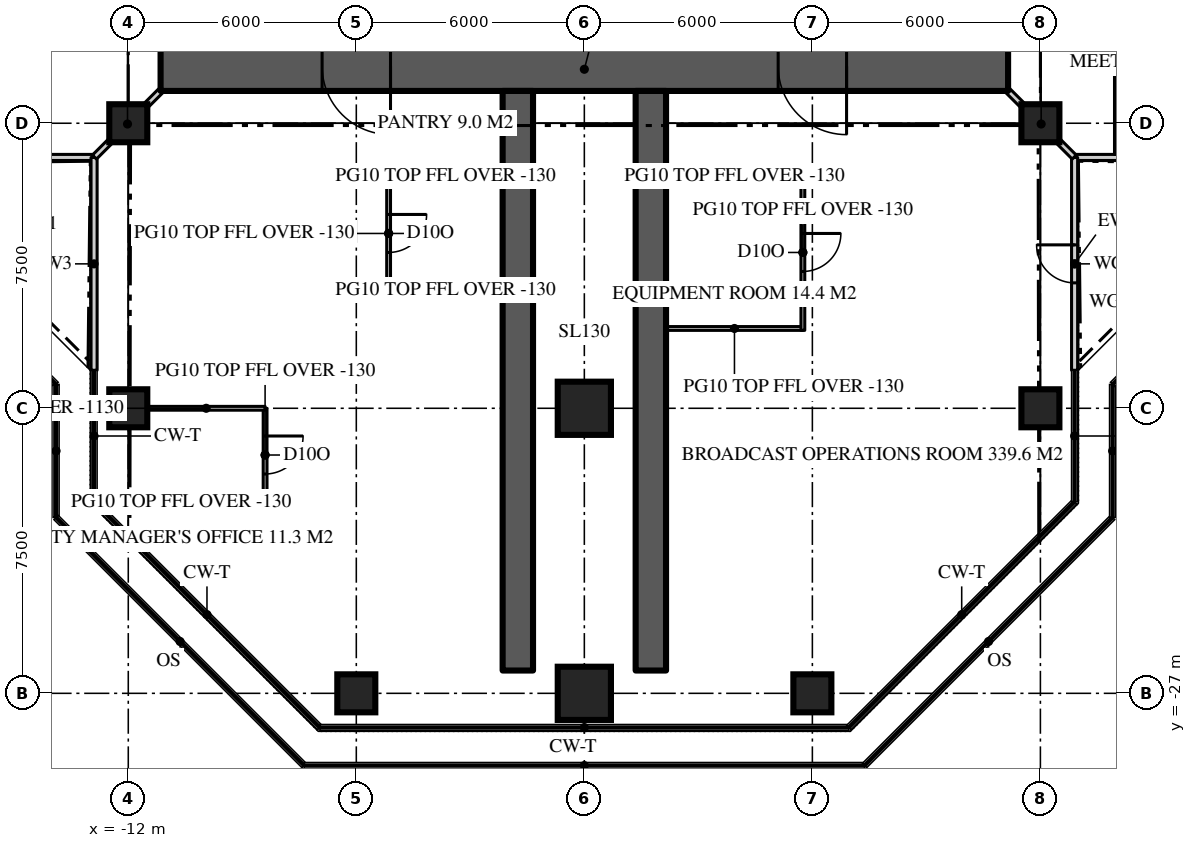
"""IFC4 building model, lengths in metres.
Left out: names, types, materials, properties, quantities, classifications, styles, units other than length and angle.
Written with IfcOpenShell. Run it as: python <this file> out.ifc"""

import sys

from ifc_helpers import new_model, si_unit, direction, frame, frame_2d, origin, origin_2d, place, context, subcontext, project, spatial, rectangle, extrude, element, fill, save


model = new_model("IFC4")
c1 = context("Model", 3, precision=1e-05, world=origin(), true_north=direction((0.0, 1.0)))
c2 = subcontext(c1, "Body", "Model", "MODEL_VIEW")
j1 = project(units=[si_unit("LENGTHUNIT", "METRE"), si_unit("PLANEANGLEUNIT", "RADIAN")], contexts=[c1])
p1 = place(None, origin())
s1 = spatial("IfcSite", under=j1, at=p1, CompositionType="ELEMENT")
p2 = place(p1, origin())
s2 = spatial("IfcBuilding", under=s1, at=p2, CompositionType="ELEMENT")
p3 = place(p2, frame((0.0, 0.0, 271.2)))
s3 = spatial("IfcBuildingStorey", under=s2, at=p3, CompositionType="ELEMENT", Elevation=271.2)
p4 = place(p3, frame((11.15, -10.5, 0.0), z_axis=(0.0, 0.0, 1.0), x_axis=(-1.0, 0.0, 0.0)))
e1 = element("IfcWall", 1, at=p4, inside=s3, PredefinedType="SHEAR", context=c2, shape_type="SweptSolid", body=[
    extrude(rectangle(XDim=22.3, YDim=1.3, at=frame_2d((11.15, 0.0))), origin(), (0.0, 0.0, 1.0), 3.9),
])
p5 = place(p4, frame((16.25, 0.0, 0.0)))
e2 = element("IfcOpeningElement", 2, at=p5, cuts=e1, PredefinedType="OPENING", context=c2, shape_type="SweptSolid", body=[
    extrude(rectangle(XDim=1.8, YDim=2.2, at=frame_2d((0.9, 1.1))), frame((0.0, 0.66, 0.0), z_axis=(0.0, -1.0, 0.0), x_axis=(1.0, 0.0, 0.0)), (0.0, 0.0, 1.0), 1.32),
])
p6 = place(p4, frame((4.25, 0.0, 0.0)))
e3 = element("IfcOpeningElement", 3, at=p6, cuts=e1, PredefinedType="OPENING", context=c2, shape_type="SweptSolid", body=[
    extrude(rectangle(XDim=1.8, YDim=2.2, at=frame_2d((0.9, 1.1))), frame((0.0, 0.66, 0.0), z_axis=(0.0, -1.0, 0.0), x_axis=(1.0, 0.0, 0.0)), (0.0, 0.0, 1.0), 1.32),
])
for number, where, z_axis, x_axis in (
    (4, (-1.75, -11.15, 0.0), (0.0, 0.0, 1.0), (0.0, -1.0, 0.0)),
    (5, (1.75, -11.15, 0.0), (0.0, 0.0, 1.0), (0.0, -1.0, 0.0)),
):
    element("IfcWall", number, at=place(p3, frame(where, z_axis=z_axis, x_axis=x_axis)), inside=s3, PredefinedType="SHEAR", context=c2, shape_type="SweptSolid", body=[
        extrude(rectangle(XDim=15.25, YDim=0.8, at=frame_2d((7.625, 0.0))), origin(), (0.0, 0.0, 1.0), 3.9),
    ])
p7 = place(p3, frame((-6.0, -27.0, 0.0), z_axis=(0.0, 0.0, 1.0), x_axis=(1.0, 0.0, 0.0)))
e6 = element("IfcColumn", 6, at=p7, inside=s3, PredefinedType="COLUMN", context=c2, shape_type="SweptSolid", body=[
    extrude(rectangle(XDim=1.0, YDim=1.0, at=origin_2d()), origin(), (0.0, 0.0, 1.0), 3.9),
])
p8 = place(p3, frame((0.0, -27.0, 0.0), z_axis=(0.0, 0.0, 1.0), x_axis=(1.0, 0.0, 0.0)))
e7 = element("IfcColumn", 7, at=p8, inside=s3, PredefinedType="COLUMN", context=c2, shape_type="SweptSolid", body=[
    extrude(rectangle(XDim=1.4, YDim=1.4, at=origin_2d()), origin(), (0.0, 0.0, 1.0), 3.9),
])
for number, where, z_axis, x_axis in (
    (8, (6.0, -27.0, 0.0), (0.0, 0.0, 1.0), (1.0, 0.0, 0.0)),
    (9, (-12.0, -19.5, 0.0), (0.0, 0.0, 1.0), (1.0, 0.0, 0.0)),
):
    element("IfcColumn", number, at=place(p3, frame(where, z_axis=z_axis, x_axis=x_axis)), inside=s3, PredefinedType="COLUMN", context=c2, shape_type="SweptSolid", body=[
        extrude(rectangle(XDim=1.0, YDim=1.0, at=origin_2d()), origin(), (0.0, 0.0, 1.0), 3.9),
    ])
p9 = place(p3, frame((0.0, -19.5, 0.0), z_axis=(0.0, 0.0, 1.0), x_axis=(1.0, 0.0, 0.0)))
e10 = element("IfcColumn", 10, at=p9, inside=s3, PredefinedType="COLUMN", context=c2, shape_type="SweptSolid", body=[
    extrude(rectangle(XDim=1.4, YDim=1.4, at=origin_2d()), origin(), (0.0, 0.0, 1.0), 3.9),
])
for number, where, z_axis, x_axis in (
    (11, (12.0, -19.5, 0.0), (0.0, 0.0, 1.0), (1.0, 0.0, 0.0)),
    (12, (-12.0, -12.0, 0.0), (0.0, 0.0, 1.0), (1.0, 0.0, 0.0)),
    (13, (12.0, -12.0, 0.0), (0.0, 0.0, 1.0), (1.0, 0.0, 0.0)),
):
    element("IfcColumn", number, at=place(p3, frame(where, z_axis=z_axis, x_axis=x_axis)), inside=s3, PredefinedType="COLUMN", context=c2, shape_type="SweptSolid", body=[
        extrude(rectangle(XDim=1.0, YDim=1.0, at=origin_2d()), origin(), (0.0, 0.0, 1.0), 3.9),
    ])
p10 = place(p3, frame((12.9, -12.9, 0.0), z_axis=(0.0, 0.0, 1.0), x_axis=(1.0, 0.0, 0.0)))
e14 = element("IfcWall", 14, at=p10, inside=s3, PredefinedType="SOLIDWALL", context=c2, shape_type="SweptSolid", body=[
    extrude(rectangle(XDim=5.6, YDim=0.16, at=frame_2d((2.8, 0.0))), origin(), (0.0, 0.0, 1.0), 3.77),
])
p11 = place(p3, frame((-18.5, -12.9, 0.0), z_axis=(0.0, 0.0, 1.0), x_axis=(1.0, 0.0, 0.0)))
e15 = element("IfcWall", 15, at=p11, inside=s3, PredefinedType="SOLIDWALL", context=c2, shape_type="SweptSolid", body=[
    extrude(rectangle(XDim=5.6, YDim=0.16, at=frame_2d((2.8, 0.0))), origin(), (0.0, 0.0, 1.0), 3.77),
])
p12 = place(p11, frame((2.3, 0.0, 0.0)))
e16 = element("IfcOpeningElement", 16, at=p12, cuts=e15, PredefinedType="OPENING", context=c2, shape_type="SweptSolid", body=[
    extrude(rectangle(XDim=1.0, YDim=2.2, at=frame_2d((0.5, 1.1))), frame((0.0, 0.09, 0.0), z_axis=(0.0, -1.0, 0.0), x_axis=(1.0, 0.0, 0.0)), (0.0, 0.0, 1.0), 0.18),
])
p13 = place(p3, frame((-12.9, -12.9, 0.0), z_axis=(0.0, 0.0, 1.0), x_axis=(0.0, -1.0, 0.0)))
e17 = element("IfcWall", 17, at=p13, inside=s3, PredefinedType="SOLIDWALL", context=c2, shape_type="SweptSolid", body=[
    extrude(rectangle(XDim=5.6, YDim=0.16, at=frame_2d((2.8, 0.0))), origin(), (0.0, 0.0, 1.0), 3.77),
])
p14 = place(p3, frame((12.9, -18.5, 0.0), z_axis=(0.0, 0.0, 1.0), x_axis=(0.0, 1.0, 0.0)))
e18 = element("IfcWall", 18, at=p14, inside=s3, PredefinedType="SOLIDWALL", context=c2, shape_type="SweptSolid", body=[
    extrude(rectangle(XDim=5.6, YDim=0.16, at=frame_2d((2.8, 0.0))), origin(), (0.0, 0.0, 1.0), 3.77),
])
p15 = place(p14, frame((2.3, 0.0, 0.0)))
e19 = element("IfcOpeningElement", 19, at=p15, cuts=e18, PredefinedType="OPENING", context=c2, shape_type="SweptSolid", body=[
    extrude(rectangle(XDim=1.0, YDim=2.2, at=frame_2d((0.5, 1.1))), frame((0.0, 0.09, 0.0), z_axis=(0.0, -1.0, 0.0), x_axis=(1.0, 0.0, 0.0)), (0.0, 0.0, 1.0), 0.18),
])
p16 = place(p3, frame((14.0, -4.0, 0.0), z_axis=(0.0, 0.0, 1.0), x_axis=(0.0, -1.0, 0.0)))
e20 = element("IfcWall", 20, at=p16, inside=s3, PredefinedType="PARTITIONING", context=c2, shape_type="SweptSolid", body=[
    extrude(rectangle(XDim=8.82, YDim=0.1, at=frame_2d((4.41, 0.0))), origin(), (0.0, 0.0, 1.0), 3.18),
])
p17 = place(p3, frame((-8.4, -19.5, 0.0), z_axis=(0.0, 0.0, 1.0), x_axis=(0.0, -1.0, 0.0)))
e21 = element("IfcWall", 21, at=p17, inside=s3, PredefinedType="PARTITIONING", context=c2, shape_type="SweptSolid", body=[
    extrude(rectangle(XDim=2.459, YDim=0.1, at=frame_2d((1.229, 0.0))), origin(), (0.0, 0.0, 1.0), 3.77),
])
p18 = place(p17, frame((0.729, 0.0, 0.0)))
e22 = element("IfcOpeningElement", 22, at=p18, cuts=e21, PredefinedType="OPENING", context=c2, shape_type="SweptSolid", body=[
    extrude(rectangle(XDim=1.0, YDim=2.2, at=frame_2d((0.5, 1.1))), frame((0.0, 0.06, 0.0), z_axis=(0.0, -1.0, 0.0), x_axis=(1.0, 0.0, 0.0)), (0.0, 0.0, 1.0), 0.12),
])
p19 = place(p3, frame((-8.4, -19.5, 0.0), z_axis=(0.0, 0.0, 1.0), x_axis=(-1.0, 0.0, 0.0)))
e23 = element("IfcWall", 23, at=p19, inside=s3, PredefinedType="PARTITIONING", context=c2, shape_type="SweptSolid", body=[
    extrude(rectangle(XDim=3.1, YDim=0.1, at=frame_2d((1.55, 0.0))), origin(), (0.0, 0.0, 1.0), 2.77),
])
p20 = place(p3, frame((-8.4, -21.959, 0.0), z_axis=(0.0, 0.0, 1.0), x_axis=(-1.0, 0.0, 0.0)))
e24 = element("IfcWall", 24, at=p20, inside=s3, PredefinedType="PARTITIONING", context=c2, shape_type="SweptSolid", body=[
    extrude(rectangle(XDim=4.42, YDim=0.1, at=frame_2d((2.21, 0.0))), origin(), (0.0, 0.0, 1.0), 3.77),
])
for number, where, z_axis, x_axis in (
    (25, (2.15, -13.4, 0.0), (0.0, 0.0, 1.0), (1.0, 0.0, 0.0)),
    (26, (2.15, -17.4, 0.0), (0.0, 0.0, 1.0), (1.0, 0.0, 0.0)),
):
    element("IfcWall", number, at=place(p3, frame(where, z_axis=z_axis, x_axis=x_axis)), inside=s3, PredefinedType="PARTITIONING", context=c2, shape_type="SweptSolid", body=[
        extrude(rectangle(XDim=3.6, YDim=0.1, at=frame_2d((1.8, 0.0))), origin(), (0.0, 0.0, 1.0), 3.77),
    ])
p21 = place(p3, frame((5.75, -13.35, 0.0), z_axis=(0.0, 0.0, 1.0), x_axis=(0.0, -1.0, 0.0)))
e27 = element("IfcWall", 27, at=p21, inside=s3, PredefinedType="PARTITIONING", context=c2, shape_type="SweptSolid", body=[
    extrude(rectangle(XDim=4.1, YDim=0.1, at=frame_2d((2.05, 0.0))), origin(), (0.0, 0.0, 1.0), 3.77),
])
p22 = place(p21, frame((1.55, 0.0, 0.0)))
e28 = element("IfcOpeningElement", 28, at=p22, cuts=e27, PredefinedType="OPENING", context=c2, shape_type="SweptSolid", body=[
    extrude(rectangle(XDim=1.0, YDim=2.2, at=frame_2d((0.5, 1.1))), frame((0.0, 0.06, 0.0), z_axis=(0.0, -1.0, 0.0), x_axis=(1.0, 0.0, 0.0)), (0.0, 0.0, 1.0), 0.12),
])
for number, where, z_axis, x_axis in (
    (29, (-2.15, -13.4, 0.0), (0.0, 0.0, 1.0), (-1.0, 0.0, 0.0)),
    (30, (-2.15, -16.4, 0.0), (0.0, 0.0, 1.0), (-1.0, 0.0, 0.0)),
):
    element("IfcWall", number, at=place(p3, frame(where, z_axis=z_axis, x_axis=x_axis)), inside=s3, PredefinedType="PARTITIONING", context=c2, shape_type="SweptSolid", body=[
        extrude(rectangle(XDim=3.0, YDim=0.1, at=frame_2d((1.5, 0.0))), origin(), (0.0, 0.0, 1.0), 3.77),
    ])
p23 = place(p3, frame((-5.15, -13.35, 0.0), z_axis=(0.0, 0.0, 1.0), x_axis=(0.0, -1.0, 0.0)))
e31 = element("IfcWall", 31, at=p23, inside=s3, PredefinedType="PARTITIONING", context=c2, shape_type="SweptSolid", body=[
    extrude(rectangle(XDim=3.1, YDim=0.1, at=frame_2d((1.55, 0.0))), origin(), (0.0, 0.0, 1.0), 3.77),
])
p24 = place(p23, frame((1.05, 0.0, 0.0)))
e32 = element("IfcOpeningElement", 32, at=p24, cuts=e31, PredefinedType="OPENING", context=c2, shape_type="SweptSolid", body=[
    extrude(rectangle(XDim=1.0, YDim=2.2, at=frame_2d((0.5, 1.1))), frame((0.0, 0.06, 0.0), z_axis=(0.0, -1.0, 0.0), x_axis=(1.0, 0.0, 0.0)), (0.0, 0.0, 1.0), 0.12),
])
for number, where, z_axis, x_axis in (
    (33, (-11.15, -11.15, 0.0), (0.0, 0.0, 1.0), (-0.707, -0.707, 0.0)),
    (34, (11.15, -11.15, 0.0), (0.0, 0.0, 1.0), (0.707, -0.707, 0.0)),
):
    element("IfcWall", number, at=place(p3, frame(where, z_axis=z_axis, x_axis=x_axis)), inside=s3, PredefinedType="PARTITIONING", context=c2, shape_type="SweptSolid", body=[
        extrude(rectangle(XDim=2.461, YDim=0.15, at=frame_2d((1.23, 0.0))), origin(), (0.0, 0.0, 1.0), 3.22),
    ])
p25 = place(p15, origin())
e35 = element("IfcDoor", 35, at=p25, inside=s3, OperationType="SINGLE_SWING_RIGHT", PredefinedType="DOOR", context=c2, shape_type="SweptSolid", body=[
    extrude(rectangle(XDim=1.0, YDim=2.2, at=frame_2d((0.5, 1.1))), frame((0.0, 0.025, 0.0), z_axis=(0.0, -1.0, 0.0), x_axis=(1.0, 0.0, 0.0)), (0.0, 0.0, 1.0), 0.05),
])
fill(e19, e35)
p26 = place(p5, origin())
e36 = element("IfcDoor", 36, at=p26, inside=s3, OperationType="DOUBLE_DOOR_DOUBLE_SWING", PredefinedType="DOOR", context=c2, shape_type="SweptSolid", body=[
    extrude(rectangle(XDim=1.8, YDim=2.2, at=frame_2d((0.9, 1.1))), frame((0.0, 0.025, 0.0), z_axis=(0.0, -1.0, 0.0), x_axis=(1.0, 0.0, 0.0)), (0.0, 0.0, 1.0), 0.05),
])
fill(e2, e36)
p27 = place(p6, origin())
e37 = element("IfcDoor", 37, at=p27, inside=s3, OperationType="DOUBLE_DOOR_DOUBLE_SWING", PredefinedType="DOOR", context=c2, shape_type="SweptSolid", body=[
    extrude(rectangle(XDim=1.8, YDim=2.2, at=frame_2d((0.9, 1.1))), frame((0.0, 0.025, 0.0), z_axis=(0.0, -1.0, 0.0), x_axis=(1.0, 0.0, 0.0)), (0.0, 0.0, 1.0), 0.05),
])
fill(e3, e37)
p28 = place(p18, origin())
e38 = element("IfcDoor", 38, at=p28, inside=s3, OperationType="SINGLE_SWING_LEFT", PredefinedType="DOOR", context=c2, shape_type="SweptSolid", body=[
    extrude(rectangle(XDim=1.0, YDim=2.2, at=frame_2d((0.5, 1.1))), frame((0.0, 0.025, 0.0), z_axis=(0.0, -1.0, 0.0), x_axis=(1.0, 0.0, 0.0)), (0.0, 0.0, 1.0), 0.05),
])
fill(e22, e38)
p29 = place(p22, origin())
e39 = element("IfcDoor", 39, at=p29, inside=s3, OperationType="SINGLE_SWING_LEFT", PredefinedType="DOOR", context=c2, shape_type="SweptSolid", body=[
    extrude(rectangle(XDim=1.0, YDim=2.2, at=frame_2d((0.5, 1.1))), frame((0.0, 0.025, 0.0), z_axis=(0.0, -1.0, 0.0), x_axis=(1.0, 0.0, 0.0)), (0.0, 0.0, 1.0), 0.05),
])
fill(e28, e39)
p30 = place(p24, origin())
e40 = element("IfcDoor", 40, at=p30, inside=s3, OperationType="SINGLE_SWING_LEFT", PredefinedType="DOOR", context=c2, shape_type="SweptSolid", body=[
    extrude(rectangle(XDim=1.0, YDim=2.2, at=frame_2d((0.5, 1.1))), frame((0.0, 0.025, 0.0), z_axis=(0.0, -1.0, 0.0), x_axis=(1.0, 0.0, 0.0)), (0.0, 0.0, 1.0), 0.05),
])
fill(e32, e40)
save(model, sys.argv[1])
